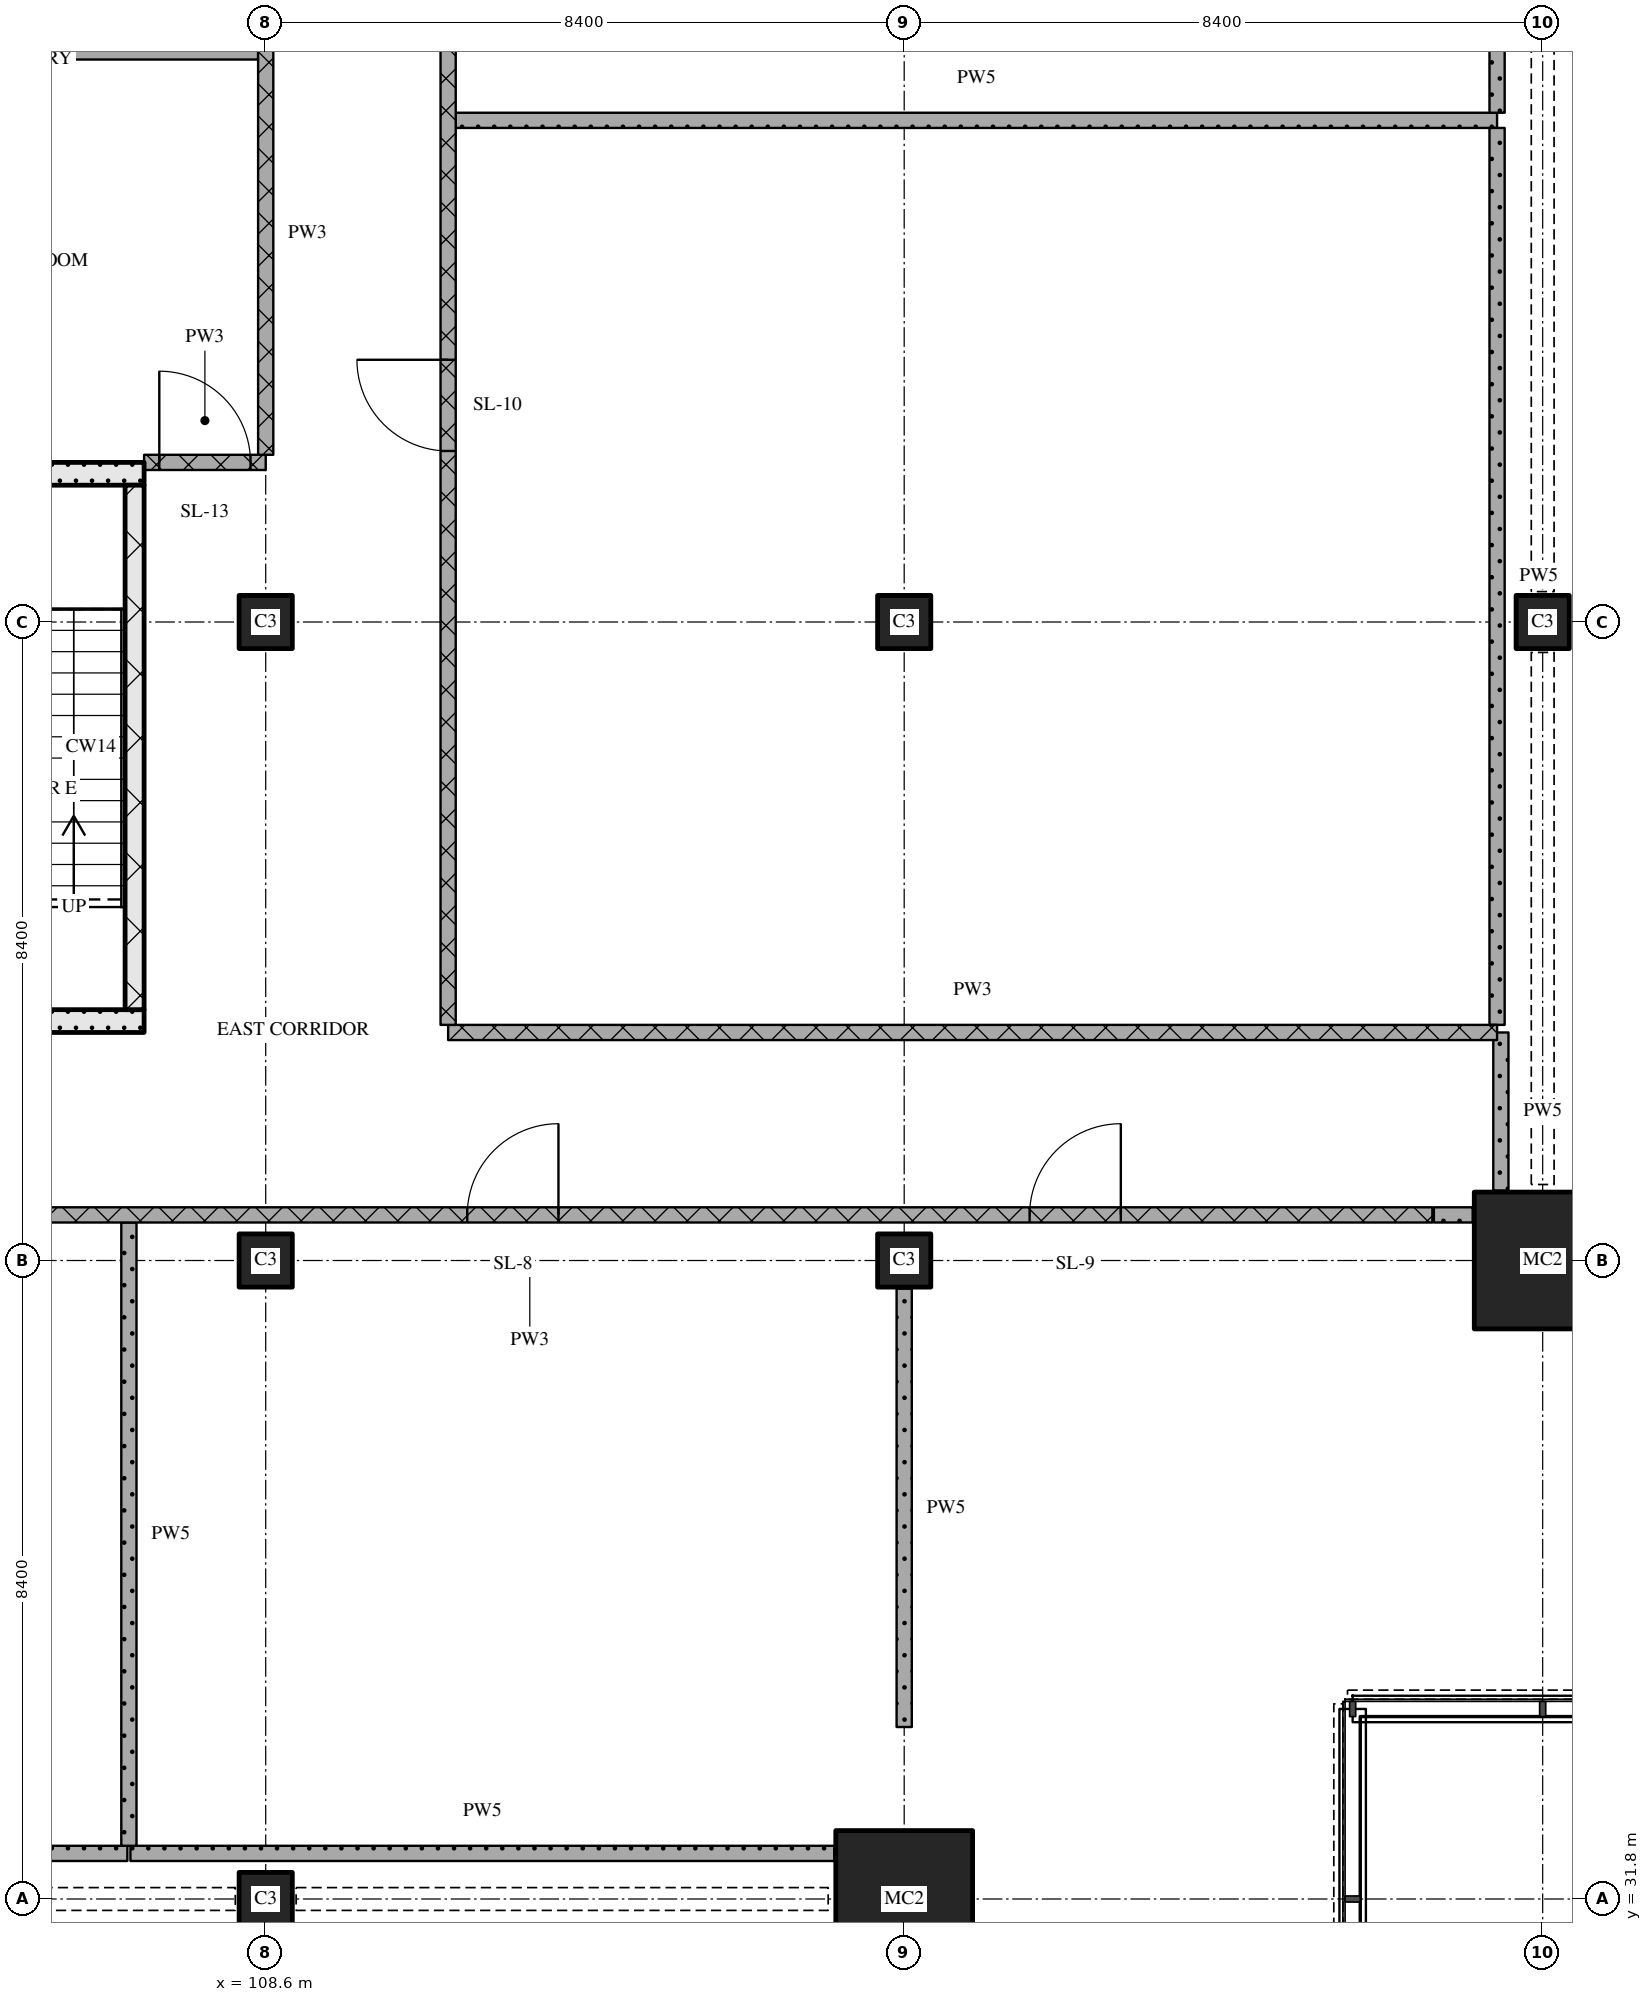
"""IFC4 building model, lengths in metres.
Left out: names, types, materials, properties, quantities, classifications, styles, units other than length and angle.
Written with IfcOpenShell. Run it as: python <this file> out.ifc"""

import sys

from ifc_helpers import new_model, si_unit, direction, frame, frame_2d, origin, origin_2d, place, context, subcontext, project, spatial, rectangle, extrude, element, fill, save


model = new_model("IFC4")
c1 = context("Model", 3, precision=1e-05, world=origin(), true_north=direction((0.0, 1.0)))
c2 = subcontext(c1, "Body", "Model", "MODEL_VIEW")
j1 = project(units=[si_unit("LENGTHUNIT", "METRE"), si_unit("PLANEANGLEUNIT", "RADIAN")], contexts=[c1])
p1 = place(None, origin())
s1 = spatial("IfcSite", under=j1, at=p1, CompositionType="ELEMENT")
p2 = place(p1, origin())
s2 = spatial("IfcBuilding", under=s1, at=p2, CompositionType="ELEMENT")
p3 = place(p2, frame((0.0, 0.0, 142.05)))
s3 = spatial("IfcBuildingStorey", under=s2, at=p3, CompositionType="ELEMENT", Elevation=142.05)
for number, where, z_axis, x_axis in (
    (1, (108.6, 31.8, 0.0), (0.0, 0.0, 1.0), (1.0, 0.0, 0.0)),
    (2, (108.6, 40.2, 0.0), (0.0, 0.0, 1.0), (1.0, 0.0, 0.0)),
    (3, (108.6, 48.6, 0.0), (0.0, 0.0, 1.0), (1.0, 0.0, 0.0)),
):
    element("IfcColumn", number, at=place(p3, frame(where, z_axis=z_axis, x_axis=x_axis)), inside=s3, PredefinedType="COLUMN", context=c2, shape_type="SweptSolid", body=[
        extrude(rectangle(XDim=0.7, YDim=0.7, at=origin_2d()), origin(), (0.0, 0.0, 1.0), 5.4),
    ])
p4 = place(p3, frame((117.0, 31.8, 0.0), z_axis=(0.0, 0.0, 1.0), x_axis=(1.0, 0.0, 0.0)))
e4 = element("IfcColumn", 4, at=p4, inside=s3, PredefinedType="COLUMN", context=c2, shape_type="SweptSolid", body=[
    extrude(rectangle(XDim=1.8, YDim=1.8, at=origin_2d()), origin(), (0.0, 0.0, 1.0), 5.4),
])
for number, where, z_axis, x_axis in (
    (5, (117.0, 40.2, 0.0), (0.0, 0.0, 1.0), (1.0, 0.0, 0.0)),
    (6, (117.0, 48.6, 0.0), (0.0, 0.0, 1.0), (1.0, 0.0, 0.0)),
):
    element("IfcColumn", number, at=place(p3, frame(where, z_axis=z_axis, x_axis=x_axis)), inside=s3, PredefinedType="COLUMN", context=c2, shape_type="SweptSolid", body=[
        extrude(rectangle(XDim=0.7, YDim=0.7, at=origin_2d()), origin(), (0.0, 0.0, 1.0), 5.4),
    ])
p5 = place(p3, frame((125.4, 40.2, 0.0), z_axis=(0.0, 0.0, 1.0), x_axis=(1.0, 0.0, 0.0)))
e7 = element("IfcColumn", 7, at=p5, inside=s3, PredefinedType="COLUMN", context=c2, shape_type="SweptSolid", body=[
    extrude(rectangle(XDim=1.8, YDim=1.8, at=origin_2d()), origin(), (0.0, 0.0, 1.0), 5.4),
])
p6 = place(p3, frame((125.4, 48.6, 0.0), z_axis=(0.0, 0.0, 1.0), x_axis=(1.0, 0.0, 0.0)))
e8 = element("IfcColumn", 8, at=p6, inside=s3, PredefinedType="COLUMN", context=c2, shape_type="SweptSolid", body=[
    extrude(rectangle(XDim=0.7, YDim=0.7, at=origin_2d()), origin(), (0.0, 0.0, 1.0), 5.4),
])
p7 = place(p3, frame((101.4, 43.35, 0.0), z_axis=(0.0, 0.0, 1.0), x_axis=(1.0, 0.0, 0.0)))
e9 = element("IfcWall", 9, at=p7, inside=s3, PredefinedType="SOLIDWALL", context=c2, shape_type="SweptSolid", body=[
    extrude(rectangle(XDim=5.6, YDim=0.3, at=frame_2d((2.8, 0.0))), origin(), (0.0, 0.0, 1.0), 5.12),
])
p8 = place(p7, frame((0.725, 0.0, 0.0)))
e10 = element("IfcOpeningElement", 10, at=p8, cuts=e9, PredefinedType="OPENING", context=c2, shape_type="SweptSolid", body=[
    extrude(rectangle(XDim=1.0, YDim=2.1, at=frame_2d((0.5, 1.05))), frame((0.0, 0.16, 0.0), z_axis=(0.0, -1.0, 0.0), x_axis=(1.0, 0.0, 0.0)), (0.0, 0.0, 1.0), 0.32),
])
p9 = place(p3, frame((106.875, 43.5, 0.0), z_axis=(0.0, 0.0, 1.0), x_axis=(0.0, 1.0, 0.0)))
e11 = element("IfcWall", 11, at=p9, inside=s3, PredefinedType="SOLIDWALL", context=c2, shape_type="SweptSolid", body=[
    extrude(rectangle(XDim=6.9, YDim=0.25, at=frame_2d((3.45, 0.0))), origin(), (0.0, 0.0, 1.0), 5.12),
])
p10 = place(p3, frame((101.4, 50.55, 0.0), z_axis=(0.0, 0.0, 1.0), x_axis=(1.0, 0.0, 0.0)))
e12 = element("IfcWall", 12, at=p10, inside=s3, PredefinedType="SOLIDWALL", context=c2, shape_type="SweptSolid", body=[
    extrude(rectangle(XDim=5.6, YDim=0.3, at=frame_2d((2.8, 0.0))), origin(), (0.0, 0.0, 1.0), 5.12),
])
p11 = place(p3, frame((98.42, 32.4, 0.0), z_axis=(0.0, 0.0, 1.0), x_axis=(1.0, 0.0, 0.0)))
e13 = element("IfcWall", 13, at=p11, inside=s3, PredefinedType="PARTITIONING", context=c2, shape_type="SweptSolid", body=[
    extrude(rectangle(XDim=8.36, YDim=0.2, at=frame_2d((4.18, 0.0))), origin(), (0.0, 0.0, 1.0), 5.12),
])
p12 = place(p3, frame((106.82, 32.4, 0.0), z_axis=(0.0, 0.0, 1.0), x_axis=(1.0, 0.0, 0.0)))
e14 = element("IfcWall", 14, at=p12, inside=s3, PredefinedType="PARTITIONING", context=c2, shape_type="SweptSolid", body=[
    extrude(rectangle(XDim=9.26, YDim=0.2, at=frame_2d((4.63, 0.0))), origin(), (0.0, 0.0, 1.0), 5.12),
])
p13 = place(p3, frame((123.948, 40.8, 0.0), z_axis=(0.0, 0.0, 1.0), x_axis=(-1.0, 0.0, 0.0)))
e15 = element("IfcWall", 15, at=p13, inside=s3, PredefinedType="PARTITIONING", context=c2, shape_type="SweptSolid", body=[
    extrude(rectangle(XDim=23.749, YDim=0.2, at=frame_2d((11.874, 0.0))), origin(), (0.0, 0.0, 1.0), 5.12),
])
p14 = place(p13, frame((4.098, 0.0, 0.0)))
e16 = element("IfcOpeningElement", 16, at=p14, cuts=e15, PredefinedType="OPENING", context=c2, shape_type="SweptSolid", body=[
    extrude(rectangle(XDim=1.2, YDim=2.1, at=frame_2d((0.6, 1.05))), frame((0.0, 0.11, 0.0), z_axis=(0.0, -1.0, 0.0), x_axis=(1.0, 0.0, 0.0)), (0.0, 0.0, 1.0), 0.22),
])
p15 = place(p13, frame((11.497, 0.0, 0.0)))
e17 = element("IfcOpeningElement", 17, at=p15, cuts=e15, PredefinedType="OPENING", context=c2, shape_type="SweptSolid", body=[
    extrude(rectangle(XDim=1.2, YDim=2.1, at=frame_2d((0.6, 1.05))), frame((0.0, 0.11, 0.0), z_axis=(0.0, -1.0, 0.0), x_axis=(1.0, 0.0, 0.0)), (0.0, 0.0, 1.0), 0.22),
])
p16 = place(p13, frame((20.749, 0.0, 0.0)))
e18 = element("IfcOpeningElement", 18, at=p16, cuts=e15, PredefinedType="OPENING", context=c2, shape_type="SweptSolid", body=[
    extrude(rectangle(XDim=1.2, YDim=2.1, at=frame_2d((0.6, 1.05))), frame((0.0, 0.11, 0.0), z_axis=(0.0, -1.0, 0.0), x_axis=(1.0, 0.0, 0.0)), (0.0, 0.0, 1.0), 0.22),
])
p17 = place(p3, frame((123.969, 40.8, 0.0), z_axis=(0.0, 0.0, 1.0), x_axis=(1.0, 0.0, 0.0)))
e19 = element("IfcWall", 19, at=p17, inside=s3, PredefinedType="PARTITIONING", context=c2, shape_type="SweptSolid", body=[
    extrude(rectangle(XDim=0.511, YDim=0.2, at=frame_2d((0.256, 0.0))), origin(), (0.0, 0.0, 1.0), 5.12),
])
p18 = place(p3, frame((111.0, 43.2, 0.0), z_axis=(0.0, 0.0, 1.0), x_axis=(1.0, 0.0, 0.0)))
e20 = element("IfcWall", 20, at=p18, inside=s3, PredefinedType="PARTITIONING", context=c2, shape_type="SweptSolid", body=[
    extrude(rectangle(XDim=13.8, YDim=0.2, at=frame_2d((6.9, 0.0))), origin(), (0.0, 0.0, 1.0), 5.12),
])
p19 = place(p3, frame((107.0, 50.7, 0.0), z_axis=(0.0, 0.0, 1.0), x_axis=(1.0, 0.0, 0.0)))
e21 = element("IfcWall", 21, at=p19, inside=s3, PredefinedType="PARTITIONING", context=c2, shape_type="SweptSolid", body=[
    extrude(rectangle(XDim=1.6, YDim=0.2, at=frame_2d((0.8, 0.0))), origin(), (0.0, 0.0, 1.0), 5.12),
])
p20 = place(p19, frame((0.2, 0.0, 0.0)))
e22 = element("IfcOpeningElement", 22, at=p20, cuts=e21, PredefinedType="OPENING", context=c2, shape_type="SweptSolid", body=[
    extrude(rectangle(XDim=1.2, YDim=2.1, at=frame_2d((0.6, 1.05))), frame((0.0, 0.11, 0.0), z_axis=(0.0, -1.0, 0.0), x_axis=(1.0, 0.0, 0.0)), (0.0, 0.0, 1.0), 0.22),
])
p21 = place(p3, frame((111.1, 55.2, 0.0), z_axis=(0.0, 0.0, 1.0), x_axis=(1.0, 0.0, 0.0)))
e23 = element("IfcWall", 23, at=p21, inside=s3, PredefinedType="PARTITIONING", context=c2, shape_type="SweptSolid", body=[
    extrude(rectangle(XDim=13.7, YDim=0.2, at=frame_2d((6.85, 0.0))), origin(), (0.0, 0.0, 1.0), 5.12),
])
p22 = place(p3, frame((101.5, 56.1, 0.0), z_axis=(0.0, 0.0, 1.0), x_axis=(1.0, 0.0, 0.0)))
e24 = element("IfcWall", 24, at=p22, inside=s3, PredefinedType="PARTITIONING", context=c2, shape_type="SweptSolid", body=[
    extrude(rectangle(XDim=7.0, YDim=0.2, at=frame_2d((3.5, 0.0))), origin(), (0.0, 0.0, 1.0), 5.12),
])
p23 = place(p3, frame((106.8, 40.7, 0.0), z_axis=(0.0, 0.0, 1.0), x_axis=(0.0, -1.0, 0.0)))
e25 = element("IfcWall", 25, at=p23, inside=s3, PredefinedType="PARTITIONING", context=c2, shape_type="SweptSolid", body=[
    extrude(rectangle(XDim=8.2, YDim=0.2, at=frame_2d((4.1, 0.0))), origin(), (0.0, 0.0, 1.0), 5.12),
])
p24 = place(p3, frame((108.6, 56.63, 0.0), z_axis=(0.0, 0.0, 1.0), x_axis=(0.0, -1.0, 0.0)))
e26 = element("IfcWall", 26, at=p24, inside=s3, PredefinedType="PARTITIONING", context=c2, shape_type="SweptSolid", body=[
    extrude(rectangle(XDim=5.83, YDim=0.2, at=frame_2d((2.915, 0.0))), origin(), (0.0, 0.0, 1.0), 5.12),
])
p25 = place(p3, frame((111.0, 73.1, 0.0), z_axis=(0.0, 0.0, 1.0), x_axis=(0.0, -1.0, 0.0)))
e27 = element("IfcWall", 27, at=p25, inside=s3, PredefinedType="PARTITIONING", context=c2, shape_type="SweptSolid", body=[
    extrude(rectangle(XDim=29.8, YDim=0.2, at=frame_2d((14.9, 0.0))), origin(), (0.0, 0.0, 1.0), 5.12),
])
p26 = place(p25, frame((3.782, 0.0, 0.0)))
e28 = element("IfcOpeningElement", 28, at=p26, cuts=e27, PredefinedType="OPENING", context=c2, shape_type="SweptSolid", body=[
    extrude(rectangle(XDim=1.2, YDim=2.1, at=frame_2d((0.6, 1.05))), frame((0.0, 0.11, 0.0), z_axis=(0.0, -1.0, 0.0), x_axis=(1.0, 0.0, 0.0)), (0.0, 0.0, 1.0), 0.22),
])
p27 = place(p25, frame((12.229, 0.0, 0.0)))
e29 = element("IfcOpeningElement", 29, at=p27, cuts=e27, PredefinedType="OPENING", context=c2, shape_type="SweptSolid", body=[
    extrude(rectangle(XDim=1.2, YDim=2.1, at=frame_2d((0.6, 1.05))), frame((0.0, 0.11, 0.0), z_axis=(0.0, -1.0, 0.0), x_axis=(1.0, 0.0, 0.0)), (0.0, 0.0, 1.0), 0.22),
])
p28 = place(p25, frame((21.05, 0.0, 0.0)))
e30 = element("IfcOpeningElement", 30, at=p28, cuts=e27, PredefinedType="OPENING", context=c2, shape_type="SweptSolid", body=[
    extrude(rectangle(XDim=1.2, YDim=2.1, at=frame_2d((0.6, 1.05))), frame((0.0, 0.11, 0.0), z_axis=(0.0, -1.0, 0.0), x_axis=(1.0, 0.0, 0.0)), (0.0, 0.0, 1.0), 0.22),
])
p29 = place(p3, frame((117.0, 39.83, 0.0), z_axis=(0.0, 0.0, 1.0), x_axis=(0.0, -1.0, 0.0)))
e31 = element("IfcWall", 31, at=p29, inside=s3, PredefinedType="PARTITIONING", context=c2, shape_type="SweptSolid", body=[
    extrude(rectangle(XDim=5.767, YDim=0.2, at=frame_2d((2.884, 0.0))), origin(), (0.0, 0.0, 1.0), 5.12),
])
p30 = place(p3, frame((124.8, 55.1, 0.0), z_axis=(0.0, 0.0, 1.0), x_axis=(0.0, -1.0, 0.0)))
e32 = element("IfcWall", 32, at=p30, inside=s3, PredefinedType="PARTITIONING", context=c2, shape_type="SweptSolid", body=[
    extrude(rectangle(XDim=11.8, YDim=0.2, at=frame_2d((5.9, 0.0))), origin(), (0.0, 0.0, 1.0), 5.12),
])
p31 = place(p3, frame((124.8, 64.48, 0.0), z_axis=(0.0, 0.0, 1.0), x_axis=(0.0, -1.0, 0.0)))
e33 = element("IfcWall", 33, at=p31, inside=s3, PredefinedType="PARTITIONING", context=c2, shape_type="SweptSolid", body=[
    extrude(rectangle(XDim=9.18, YDim=0.2, at=frame_2d((4.59, 0.0))), origin(), (0.0, 0.0, 1.0), 5.12),
])
p32 = place(p3, frame((124.85, 43.2, 0.0), z_axis=(0.0, 0.0, 1.0), x_axis=(0.0, -1.0, 0.0)))
e34 = element("IfcWall", 34, at=p32, inside=s3, PredefinedType="PARTITIONING", context=c2, shape_type="SweptSolid", body=[
    extrude(rectangle(XDim=2.08, YDim=0.2, at=frame_2d((1.04, 0.0))), origin(), (0.0, 0.0, 1.0), 5.12),
])
p33 = place(p14, origin())
e35 = element("IfcDoor", 35, at=p33, inside=s3, OperationType="SINGLE_SWING_RIGHT", PredefinedType="DOOR", context=c2, shape_type="SweptSolid", body=[
    extrude(rectangle(XDim=1.2, YDim=2.1, at=frame_2d((0.6, 1.05))), frame((0.0, 0.025, 0.0), z_axis=(0.0, -1.0, 0.0), x_axis=(1.0, 0.0, 0.0)), (0.0, 0.0, 1.0), 0.05),
])
fill(e16, e35)
p34 = place(p15, origin())
e36 = element("IfcDoor", 36, at=p34, inside=s3, OperationType="SINGLE_SWING_RIGHT", PredefinedType="DOOR", context=c2, shape_type="SweptSolid", body=[
    extrude(rectangle(XDim=1.2, YDim=2.1, at=frame_2d((0.6, 1.05))), frame((0.0, 0.025, 0.0), z_axis=(0.0, -1.0, 0.0), x_axis=(1.0, 0.0, 0.0)), (0.0, 0.0, 1.0), 0.05),
])
fill(e17, e36)
p35 = place(p20, origin())
e37 = element("IfcDoor", 37, at=p35, inside=s3, OperationType="SINGLE_SWING_LEFT", PredefinedType="DOOR", context=c2, shape_type="SweptSolid", body=[
    extrude(rectangle(XDim=1.2, YDim=2.1, at=frame_2d((0.6, 1.05))), frame((0.0, 0.025, 0.0), z_axis=(0.0, -1.0, 0.0), x_axis=(1.0, 0.0, 0.0)), (0.0, 0.0, 1.0), 0.05),
])
fill(e22, e37)
p36 = place(p28, origin())
e38 = element("IfcDoor", 38, at=p36, inside=s3, OperationType="SINGLE_SWING_RIGHT", PredefinedType="DOOR", context=c2, shape_type="SweptSolid", body=[
    extrude(rectangle(XDim=1.2, YDim=2.1, at=frame_2d((0.6, 1.05))), frame((0.0, 0.025, 0.0), z_axis=(0.0, -1.0, 0.0), x_axis=(1.0, 0.0, 0.0)), (0.0, 0.0, 1.0), 0.05),
])
fill(e30, e38)
save(model, sys.argv[1])
